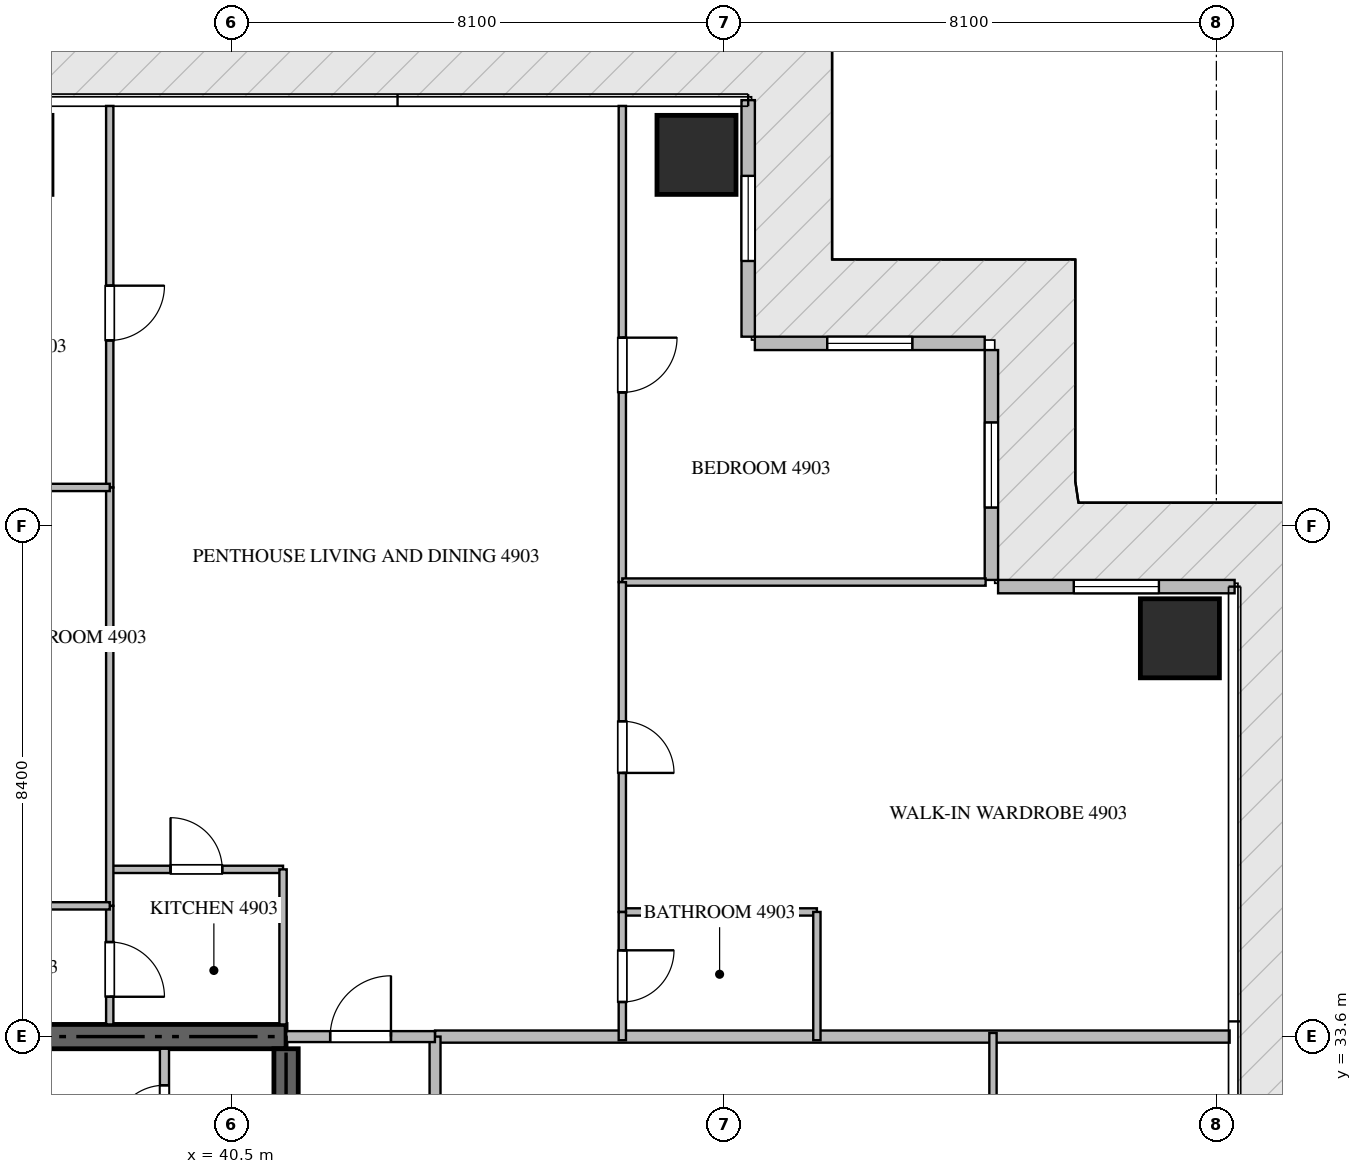
"""IFC4 building model, lengths in metres.
Left out: names, types, materials, properties, quantities, classifications, styles, units other than length and angle.
Written with IfcOpenShell. Run it as: python <this file> out.ifc"""

import sys

from ifc_helpers import new_model, si_unit, direction, frame, frame_2d, origin, origin_2d, place, context, subcontext, project, spatial, rectangle, extrude, source, transform, mapped, element, fill, save


model = new_model("IFC4")
c1 = context("Model", 3, precision=1e-05, world=origin(), true_north=direction((0.0, 1.0)))
c2 = subcontext(c1, "Body", "Model", "MODEL_VIEW")
j1 = project(units=[si_unit("LENGTHUNIT", "METRE"), si_unit("PLANEANGLEUNIT", "RADIAN")], contexts=[c1])
p1 = place(None, origin())
s1 = spatial("IfcSite", under=j1, at=p1, CompositionType="ELEMENT")
p2 = place(p1, origin())
s2 = spatial("IfcBuilding", under=s1, at=p2, CompositionType="ELEMENT")
p3 = place(p2, frame((0.0, 0.0, 195.15)))
s3 = spatial("IfcBuildingStorey", under=s2, at=p3, CompositionType="ELEMENT", Elevation=195.15)
p4 = place(p3, frame((41.4, 33.6, -0.26), z_axis=(0.0, 0.0, 1.0), x_axis=(-1.0, 0.0, 0.0)))
e1 = element("IfcWall", 1, at=p4, inside=s3, PredefinedType="SHEAR", context=c2, shape_type="SweptSolid", body=[
    extrude(rectangle(XDim=18.0, YDim=0.4, at=frame_2d((9.0, 0.0))), origin(), (0.0, 0.0, 1.0), 3.568),
])
p5 = place(p3, frame((41.4, 27.75, -0.26), z_axis=(0.0, 0.0, 1.0), x_axis=(0.0, 1.0, 0.0)))
e2 = element("IfcWall", 2, at=p5, inside=s3, PredefinedType="SHEAR", context=c2, shape_type="SweptSolid", body=[
    extrude(rectangle(XDim=5.65, YDim=0.4, at=frame_2d((2.825, 0.0))), origin(), (0.0, 0.0, 1.0), 3.568),
])
m1 = source(origin(), c2, "Body", "SweptSolid", [
    extrude(rectangle(XDim=1.3, YDim=1.3, at=origin_2d()), origin(), (0.0, 0.0, 1.0), 3.57),
])
for number, where, z_axis, x_axis in (
    (3, (48.15, 48.1, -0.26), (0.0, 0.0, 1.0), (1.0, 0.0, 0.0)),
    (4, (56.1, 40.15, -0.26), (0.0, 0.0, 1.0), (1.0, 0.0, 0.0)),
):
    element("IfcColumn", number, at=place(p3, frame(where, z_axis=z_axis, x_axis=x_axis)), inside=s3, PredefinedType="COLUMN", context=c2, shape_type="MappedRepresentation", body=[
        mapped(m1, transform((0.0, 0.0, 0.0), scale=1.0)),
    ])
p6 = place(p3, frame((57.0, 41.0, 0.0), z_axis=(0.0, 0.0, 1.0), x_axis=(-1.0, 0.0, 0.0)))
e5 = element("IfcWall", 5, at=p6, inside=s3, PredefinedType="ELEMENTEDWALL", context=c2, shape_type="SweptSolid", body=[
    extrude(rectangle(XDim=3.89, YDim=0.22, at=frame_2d((1.945, 0.0))), origin(), (0.0, 0.0, 1.0), 3.295),
])
p7 = place(p6, frame((1.245, 0.0, 0.65)))
e6 = element("IfcOpeningElement", 6, at=p7, cuts=e5, PredefinedType="OPENING", context=c2, shape_type="SweptSolid", body=[
    extrude(rectangle(XDim=1.4, YDim=1.35, at=frame_2d((0.7, 0.675))), frame((0.0, 0.12, 0.0), z_axis=(0.0, -1.0, 0.0), x_axis=(1.0, 0.0, 0.0)), (0.0, 0.0, 1.0), 0.24),
])
p8 = place(p3, frame((53.0, 41.11, 0.0), z_axis=(0.0, 0.0, 1.0), x_axis=(0.0, 1.0, 0.0)))
e7 = element("IfcWall", 7, at=p8, inside=s3, PredefinedType="ELEMENTEDWALL", context=c2, shape_type="SweptSolid", body=[
    extrude(rectangle(XDim=3.78, YDim=0.22, at=frame_2d((1.89, 0.0))), origin(), (0.0, 0.0, 1.0), 3.295),
])
p9 = place(p8, frame((1.19, 0.0, 0.65)))
e8 = element("IfcOpeningElement", 8, at=p9, cuts=e7, PredefinedType="OPENING", context=c2, shape_type="SweptSolid", body=[
    extrude(rectangle(XDim=1.4, YDim=1.35, at=frame_2d((0.7, 0.675))), frame((0.0, 0.12, 0.0), z_axis=(0.0, -1.0, 0.0), x_axis=(1.0, 0.0, 0.0)), (0.0, 0.0, 1.0), 0.24),
])
p10 = place(p3, frame((52.89, 45.0, 0.0), z_axis=(0.0, 0.0, 1.0), x_axis=(-1.0, 0.0, 0.0)))
e9 = element("IfcWall", 9, at=p10, inside=s3, PredefinedType="ELEMENTEDWALL", context=c2, shape_type="SweptSolid", body=[
    extrude(rectangle(XDim=3.78, YDim=0.22, at=frame_2d((1.89, 0.0))), origin(), (0.0, 0.0, 1.0), 3.295),
])
p11 = place(p10, frame((1.19, 0.0, 0.65)))
e10 = element("IfcOpeningElement", 10, at=p11, cuts=e9, PredefinedType="OPENING", context=c2, shape_type="SweptSolid", body=[
    extrude(rectangle(XDim=1.4, YDim=1.35, at=frame_2d((0.7, 0.675))), frame((0.0, 0.12, 0.0), z_axis=(0.0, -1.0, 0.0), x_axis=(1.0, 0.0, 0.0)), (0.0, 0.0, 1.0), 0.24),
])
p12 = place(p3, frame((49.0, 45.11, 0.0), z_axis=(0.0, 0.0, 1.0), x_axis=(0.0, 1.0, 0.0)))
e11 = element("IfcWall", 11, at=p12, inside=s3, PredefinedType="ELEMENTEDWALL", context=c2, shape_type="SweptSolid", body=[
    extrude(rectangle(XDim=3.89, YDim=0.22, at=frame_2d((1.945, 0.0))), origin(), (0.0, 0.0, 1.0), 3.295),
])
p13 = place(p12, frame((1.245, 0.0, 0.65)))
e12 = element("IfcOpeningElement", 12, at=p13, cuts=e11, PredefinedType="OPENING", context=c2, shape_type="SweptSolid", body=[
    extrude(rectangle(XDim=1.4, YDim=1.35, at=frame_2d((0.7, 0.675))), frame((0.0, 0.12, 0.0), z_axis=(0.0, -1.0, 0.0), x_axis=(1.0, 0.0, 0.0)), (0.0, 0.0, 1.0), 0.24),
])
p14 = place(p3, frame((39.4, 31.35, 0.0), z_axis=(0.0, 0.0, 1.0), x_axis=(0.0, 1.0, 0.0)))
e13 = element("IfcWall", 13, at=p14, inside=s3, PredefinedType="PARTITIONING", context=c2, shape_type="SweptSolid", body=[
    extrude(rectangle(XDim=2.05, YDim=0.15, at=frame_2d((1.025, 0.0))), origin(), (0.0, 0.0, 1.0), 3.31),
])
p15 = place(p14, frame((0.6, 0.0, 0.0)))
e14 = element("IfcOpeningElement", 14, at=p15, cuts=e13, PredefinedType="OPENING", context=c2, shape_type="SweptSolid", body=[
    extrude(rectangle(XDim=0.85, YDim=2.1, at=frame_2d((0.425, 1.05))), frame((0.0, 0.085, 0.0), z_axis=(0.0, -1.0, 0.0), x_axis=(1.0, 0.0, 0.0)), (0.0, 0.0, 1.0), 0.17),
])
p16 = place(p3, frame((43.85, 33.6, 0.0), z_axis=(0.0, 0.0, 1.0), x_axis=(1.0, 0.0, 0.0)))
e15 = element("IfcWall", 15, at=p16, inside=s3, PredefinedType="PARTITIONING", context=c2, shape_type="SweptSolid", body=[
    extrude(rectangle(XDim=13.068, YDim=0.2, at=frame_2d((6.534, 0.0))), origin(), (0.0, 0.0, 1.0), 3.31),
])
p17 = place(p3, frame((43.85, 14.9, 0.0), z_axis=(0.0, 0.0, 1.0), x_axis=(0.0, 1.0, 0.0)))
e16 = element("IfcWall", 16, at=p17, inside=s3, PredefinedType="PARTITIONING", context=c2, shape_type="SweptSolid", body=[
    extrude(rectangle(XDim=18.7, YDim=0.18, at=frame_2d((9.35, 0.0))), origin(), (0.0, 0.0, 1.0), 3.31),
])
p18 = place(p17, frame((1.805, 0.0, 0.0)))
e17 = element("IfcOpeningElement", 17, at=p18, cuts=e16, PredefinedType="OPENING", context=c2, shape_type="SweptSolid", body=[
    extrude(rectangle(XDim=1.0, YDim=2.15, at=frame_2d((0.5, 1.075))), frame((0.0, 0.1, 0.0), z_axis=(0.0, -1.0, 0.0), x_axis=(1.0, 0.0, 0.0)), (0.0, 0.0, 1.0), 0.2),
])
p19 = place(p3, frame((41.402, 33.6, 0.0), z_axis=(0.0, 0.0, 1.0), x_axis=(1.0, 0.0, 0.0)))
e18 = element("IfcWall", 18, at=p19, inside=s3, PredefinedType="PARTITIONING", context=c2, shape_type="SweptSolid", body=[
    extrude(rectangle(XDim=2.446, YDim=0.18, at=frame_2d((1.223, 0.0))), origin(), (0.0, 0.0, 1.0), 3.31),
])
p20 = place(p19, frame((0.723, 0.0, 0.0)))
e19 = element("IfcOpeningElement", 19, at=p20, cuts=e18, PredefinedType="OPENING", context=c2, shape_type="SweptSolid", body=[
    extrude(rectangle(XDim=1.0, YDim=2.15, at=frame_2d((0.5, 1.075))), frame((0.0, 0.1, 0.0), z_axis=(0.0, -1.0, 0.0), x_axis=(1.0, 0.0, 0.0)), (0.0, 0.0, 1.0), 0.2),
])
p21 = place(p3, frame((38.5, 36.35, 0.0), z_axis=(0.0, 0.0, 1.0), x_axis=(1.0, 0.0, 0.0)))
e20 = element("IfcWall", 20, at=p21, inside=s3, PredefinedType="PARTITIONING", context=c2, shape_type="SweptSolid", body=[
    extrude(rectangle(XDim=2.85, YDim=0.12, at=frame_2d((1.425, 0.0))), origin(), (0.0, 0.0, 1.0), 2.145),
])
p22 = place(p21, frame((1.0, 0.0, 0.0)))
e21 = element("IfcOpeningElement", 21, at=p22, cuts=e20, PredefinedType="OPENING", context=c2, shape_type="SweptSolid", body=[
    extrude(rectangle(XDim=0.85, YDim=2.1, at=frame_2d((0.425, 1.05))), frame((0.0, 0.07, 0.0), z_axis=(0.0, -1.0, 0.0), x_axis=(1.0, 0.0, 0.0)), (0.0, 0.0, 1.0), 0.14),
])
p23 = place(p3, frame((41.35, 36.35, 0.0), z_axis=(0.0, 0.0, 1.0), x_axis=(0.0, -1.0, 0.0)))
e22 = element("IfcWall", 22, at=p23, inside=s3, PredefinedType="PARTITIONING", context=c2, shape_type="SweptSolid", body=[
    extrude(rectangle(XDim=2.55, YDim=0.12, at=frame_2d((1.275, 0.0))), origin(), (0.0, 0.0, 1.0), 3.31),
])
p24 = place(p3, frame((38.5, 35.75, 0.0), z_axis=(0.0, 0.0, 1.0), x_axis=(0.0, -1.0, 0.0)))
e23 = element("IfcWall", 23, at=p24, inside=s3, PredefinedType="PARTITIONING", context=c2, shape_type="SweptSolid", body=[
    extrude(rectangle(XDim=1.95, YDim=0.12, at=frame_2d((0.975, 0.0))), origin(), (0.0, 0.0, 1.0), 3.31),
])
p25 = place(p24, frame((0.595, 0.0, 0.0)))
e24 = element("IfcOpeningElement", 24, at=p25, cuts=e23, PredefinedType="OPENING", context=c2, shape_type="SweptSolid", body=[
    extrude(rectangle(XDim=0.9, YDim=2.1, at=frame_2d((0.45, 1.05))), frame((0.0, 0.07, 0.0), z_axis=(0.0, -1.0, 0.0), x_axis=(1.0, 0.0, 0.0)), (0.0, 0.0, 1.0), 0.14),
])
p26 = place(p3, frame((38.5, 48.905, 0.0), z_axis=(0.0, 0.0, 1.0), x_axis=(0.0, -1.0, 0.0)))
e25 = element("IfcWall", 25, at=p26, inside=s3, PredefinedType="PARTITIONING", context=c2, shape_type="SweptSolid", body=[
    extrude(rectangle(XDim=6.274, YDim=0.12, at=frame_2d((3.137, 0.0))), origin(), (0.0, 0.0, 1.0), 3.31),
])
p27 = place(p26, frame((2.956, 0.0, 0.0)))
e26 = element("IfcOpeningElement", 26, at=p27, cuts=e25, PredefinedType="OPENING", context=c2, shape_type="SweptSolid", body=[
    extrude(rectangle(XDim=0.9, YDim=2.1, at=frame_2d((0.45, 1.05))), frame((0.0, 0.07, 0.0), z_axis=(0.0, -1.0, 0.0), x_axis=(1.0, 0.0, 0.0)), (0.0, 0.0, 1.0), 0.14),
])
p28 = place(p3, frame((38.5, 42.629, 0.0), z_axis=(0.0, 0.0, 1.0), x_axis=(0.0, -1.0, 0.0)))
e27 = element("IfcWall", 27, at=p28, inside=s3, PredefinedType="PARTITIONING", context=c2, shape_type="SweptSolid", body=[
    extrude(rectangle(XDim=6.877, YDim=0.12, at=frame_2d((3.438, 0.0))), origin(), (0.0, 0.0, 1.0), 3.31),
])
p29 = place(p3, frame((33.35, 42.631, 0.0), z_axis=(0.0, 0.0, 1.0), x_axis=(1.0, 0.0, 0.0)))
e28 = element("IfcWall", 28, at=p29, inside=s3, PredefinedType="PARTITIONING", context=c2, shape_type="SweptSolid", body=[
    extrude(rectangle(XDim=5.15, YDim=0.12, at=frame_2d((2.575, 0.0))), origin(), (0.0, 0.0, 1.0), 3.31),
])
p30 = place(p3, frame((35.452, 35.75, 0.0), z_axis=(0.0, 0.0, 1.0), x_axis=(1.0, 0.0, 0.0)))
e29 = element("IfcWall", 29, at=p30, inside=s3, PredefinedType="PARTITIONING", context=c2, shape_type="SweptSolid", body=[
    extrude(rectangle(XDim=3.048, YDim=0.12, at=frame_2d((1.524, 0.0))), origin(), (0.0, 0.0, 1.0), 3.31),
])
p31 = place(p30, frame((1.099, 0.0, 0.0)))
e30 = element("IfcOpeningElement", 30, at=p31, cuts=e29, PredefinedType="OPENING", context=c2, shape_type="SweptSolid", body=[
    extrude(rectangle(XDim=0.85, YDim=2.1, at=frame_2d((0.425, 1.05))), frame((0.0, 0.07, 0.0), z_axis=(0.0, -1.0, 0.0), x_axis=(1.0, 0.0, 0.0)), (0.0, 0.0, 1.0), 0.14),
])
p32 = place(p3, frame((46.93, 48.905, 0.0), z_axis=(0.0, 0.0, 1.0), x_axis=(0.0, -1.0, 0.0)))
e31 = element("IfcWall", 31, at=p32, inside=s3, PredefinedType="PARTITIONING", context=c2, shape_type="SweptSolid", body=[
    extrude(rectangle(XDim=7.83, YDim=0.12, at=frame_2d((3.915, 0.0))), origin(), (0.0, 0.0, 1.0), 3.31),
])
p33 = place(p32, frame((3.811, 0.0, 0.0)))
e32 = element("IfcOpeningElement", 32, at=p33, cuts=e31, PredefinedType="OPENING", context=c2, shape_type="SweptSolid", body=[
    extrude(rectangle(XDim=0.9, YDim=2.1, at=frame_2d((0.45, 1.05))), frame((0.0, 0.07, 0.0), z_axis=(0.0, -1.0, 0.0), x_axis=(1.0, 0.0, 0.0)), (0.0, 0.0, 1.0), 0.14),
])
p34 = place(p3, frame((46.93, 41.075, 0.0), z_axis=(0.0, 0.0, 1.0), x_axis=(1.0, 0.0, 0.0)))
e33 = element("IfcWall", 33, at=p34, inside=s3, PredefinedType="PARTITIONING", context=c2, shape_type="SweptSolid", body=[
    extrude(rectangle(XDim=5.975, YDim=0.12, at=frame_2d((2.988, 0.0))), origin(), (0.0, 0.0, 1.0), 3.31),
])
p35 = place(p3, frame((46.93, 35.65, 0.0), z_axis=(0.0, 0.0, 1.0), x_axis=(1.0, 0.0, 0.0)))
e34 = element("IfcWall", 34, at=p35, inside=s3, PredefinedType="PARTITIONING", context=c2, shape_type="SweptSolid", body=[
    extrude(rectangle(XDim=3.2, YDim=0.12, at=frame_2d((1.6, 0.0))), origin(), (0.0, 0.0, 1.0), 3.31),
])
p36 = place(p3, frame((50.13, 35.65, 0.0), z_axis=(0.0, 0.0, 1.0), x_axis=(0.0, -1.0, 0.0)))
e35 = element("IfcWall", 35, at=p36, inside=s3, PredefinedType="PARTITIONING", context=c2, shape_type="SweptSolid", body=[
    extrude(rectangle(XDim=2.11, YDim=0.12, at=frame_2d((1.055, 0.0))), origin(), (0.0, 0.0, 1.0), 3.31),
])
p37 = place(p3, frame((46.93, 41.073, 0.0), z_axis=(0.0, 0.0, 1.0), x_axis=(0.0, -1.0, 0.0)))
e36 = element("IfcWall", 36, at=p37, inside=s3, PredefinedType="PARTITIONING", context=c2, shape_type="SweptSolid", body=[
    extrude(rectangle(XDim=5.423, YDim=0.12, at=frame_2d((2.711, 0.0))), origin(), (0.0, 0.0, 1.0), 3.31),
])
p38 = place(p37, frame((2.287, 0.0, 0.0)))
e37 = element("IfcOpeningElement", 37, at=p38, cuts=e36, PredefinedType="OPENING", context=c2, shape_type="SweptSolid", body=[
    extrude(rectangle(XDim=0.85, YDim=2.1, at=frame_2d((0.425, 1.05))), frame((0.0, 0.07, 0.0), z_axis=(0.0, -1.0, 0.0), x_axis=(1.0, 0.0, 0.0)), (0.0, 0.0, 1.0), 0.14),
])
p39 = place(p3, frame((46.93, 35.648, 0.0), z_axis=(0.0, 0.0, 1.0), x_axis=(0.0, -1.0, 0.0)))
e38 = element("IfcWall", 38, at=p39, inside=s3, PredefinedType="PARTITIONING", context=c2, shape_type="SweptSolid", body=[
    extrude(rectangle(XDim=2.108, YDim=0.12, at=frame_2d((1.054, 0.0))), origin(), (0.0, 0.0, 1.0), 3.31),
])
p40 = place(p39, frame((0.629, 0.0, 0.0)))
e39 = element("IfcOpeningElement", 39, at=p40, cuts=e38, PredefinedType="OPENING", context=c2, shape_type="SweptSolid", body=[
    extrude(rectangle(XDim=0.85, YDim=2.1, at=frame_2d((0.425, 1.05))), frame((0.0, 0.07, 0.0), z_axis=(0.0, -1.0, 0.0), x_axis=(1.0, 0.0, 0.0)), (0.0, 0.0, 1.0), 0.14),
])
p41 = place(p3, frame((53.026, 22.6, 0.0), z_axis=(0.0, 0.0, 1.0), x_axis=(0.0, 1.0, 0.0)))
e40 = element("IfcWall", 40, at=p41, inside=s3, PredefinedType="PARTITIONING", context=c2, shape_type="SweptSolid", body=[
    extrude(rectangle(XDim=11.06, YDim=0.12, at=frame_2d((5.53, 0.0))), origin(), (0.0, 0.0, 1.0), 3.31),
])
m2 = source(origin(), c2, "Body", "SweptSolid", [
    extrude(rectangle(XDim=1.4, YDim=1.35, at=frame_2d((0.7, 0.675))), frame((0.0, 0.03, 0.0), z_axis=(0.0, -1.0, 0.0), x_axis=(1.0, 0.0, 0.0)), (0.0, 0.0, 1.0), 0.06),
])
p42 = place(p7, origin())
e41 = element("IfcWindow", 41, at=p42, inside=s3, PartitioningType="SINGLE_PANEL", PredefinedType="WINDOW", context=c2, shape_type="MappedRepresentation", body=[
    mapped(m2, transform((0.0, 0.0, 0.0), scale=1.0)),
])
fill(e6, e41)
p43 = place(p9, origin())
e42 = element("IfcWindow", 42, at=p43, inside=s3, PartitioningType="SINGLE_PANEL", PredefinedType="WINDOW", context=c2, shape_type="MappedRepresentation", body=[
    mapped(m2, transform((0.0, 0.0, 0.0), scale=1.0)),
])
fill(e8, e42)
p44 = place(p11, origin())
e43 = element("IfcWindow", 43, at=p44, inside=s3, PartitioningType="SINGLE_PANEL", PredefinedType="WINDOW", context=c2, shape_type="MappedRepresentation", body=[
    mapped(m2, transform((0.0, 0.0, 0.0), scale=1.0)),
])
fill(e10, e43)
p45 = place(p13, origin())
e44 = element("IfcWindow", 44, at=p45, inside=s3, PartitioningType="SINGLE_PANEL", PredefinedType="WINDOW", context=c2, shape_type="MappedRepresentation", body=[
    mapped(m2, transform((0.0, 0.0, 0.0), scale=1.0)),
])
fill(e12, e44)
m3 = source(origin(), c2, "Body", "SweptSolid", [
    extrude(rectangle(XDim=0.85, YDim=2.1, at=frame_2d((0.425, 1.05))), frame((0.0, 0.025, 0.0), z_axis=(0.0, -1.0, 0.0), x_axis=(1.0, 0.0, 0.0)), (0.0, 0.0, 1.0), 0.05),
])
p46 = place(p15, origin())
e45 = element("IfcDoor", 45, at=p46, inside=s3, OperationType="SINGLE_SWING_LEFT", PredefinedType="DOOR", context=c2, shape_type="MappedRepresentation", body=[
    mapped(m3, transform((0.0, 0.0, 0.0), scale=1.0)),
])
fill(e14, e45)
m4 = source(origin(), c2, "Body", "SweptSolid", [
    extrude(rectangle(XDim=1.0, YDim=2.15, at=frame_2d((0.5, 1.075))), frame((0.0, 0.025, 0.0), z_axis=(0.0, -1.0, 0.0), x_axis=(1.0, 0.0, 0.0)), (0.0, 0.0, 1.0), 0.05),
])
p47 = place(p20, origin())
e46 = element("IfcDoor", 46, at=p47, inside=s3, OperationType="SINGLE_SWING_RIGHT", PredefinedType="DOOR", context=c2, shape_type="MappedRepresentation", body=[
    mapped(m4, transform((0.0, 0.0, 0.0), scale=1.0)),
])
fill(e19, e46)
p48 = place(p22, origin())
e47 = element("IfcDoor", 47, at=p48, inside=s3, OperationType="SINGLE_SWING_LEFT", PredefinedType="DOOR", context=c2, shape_type="MappedRepresentation", body=[
    mapped(m3, transform((0.0, 0.0, 0.0), scale=1.0)),
])
fill(e21, e47)
m5 = source(origin(), c2, "Body", "SweptSolid", [
    extrude(rectangle(XDim=0.9, YDim=2.1, at=frame_2d((0.45, 1.05))), frame((0.0, 0.025, 0.0), z_axis=(0.0, -1.0, 0.0), x_axis=(1.0, 0.0, 0.0)), (0.0, 0.0, 1.0), 0.05),
])
p49 = place(p25, origin())
e48 = element("IfcDoor", 48, at=p49, inside=s3, OperationType="SINGLE_SWING_RIGHT", PredefinedType="DOOR", context=c2, shape_type="MappedRepresentation", body=[
    mapped(m5, transform((0.0, 0.0, 0.0), scale=1.0)),
])
fill(e24, e48)
p50 = place(p27, origin())
e49 = element("IfcDoor", 49, at=p50, inside=s3, OperationType="SINGLE_SWING_LEFT", PredefinedType="DOOR", context=c2, shape_type="MappedRepresentation", body=[
    mapped(m5, transform((0.0, 0.0, 0.0), scale=1.0)),
])
fill(e26, e49)
p51 = place(p33, origin())
e50 = element("IfcDoor", 50, at=p51, inside=s3, OperationType="SINGLE_SWING_LEFT", PredefinedType="DOOR", context=c2, shape_type="MappedRepresentation", body=[
    mapped(m5, transform((0.0, 0.0, 0.0), scale=1.0)),
])
fill(e32, e50)
p52 = place(p38, origin())
e51 = element("IfcDoor", 51, at=p52, inside=s3, OperationType="SINGLE_SWING_RIGHT", PredefinedType="DOOR", context=c2, shape_type="MappedRepresentation", body=[
    mapped(m3, transform((0.0, 0.0, 0.0), scale=1.0)),
])
fill(e37, e51)
p53 = place(p40, origin())
e52 = element("IfcDoor", 52, at=p53, inside=s3, OperationType="SINGLE_SWING_LEFT", PredefinedType="DOOR", context=c2, shape_type="MappedRepresentation", body=[
    mapped(m3, transform((0.0, 0.0, 0.0), scale=1.0)),
])
fill(e39, e52)
save(model, sys.argv[1])
